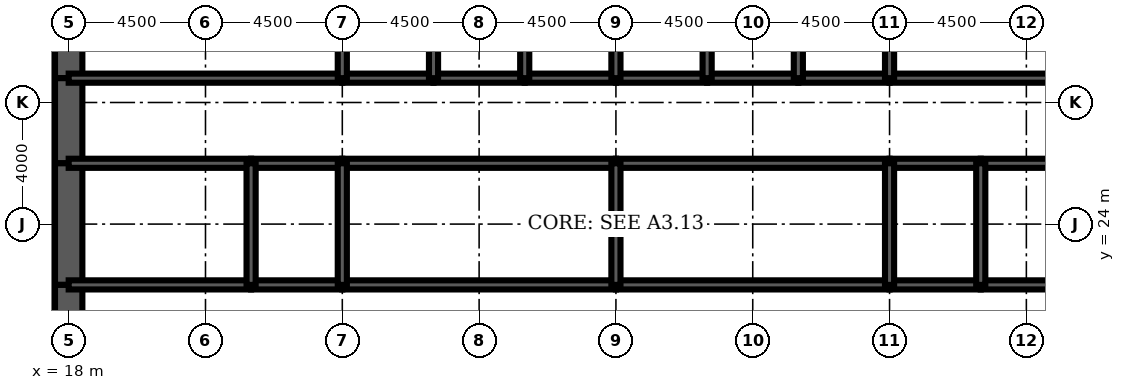
"""IFC4 building model, lengths in metres.
Left out: names, types, materials, properties, quantities, classifications, styles, units other than length and angle.
Written with IfcOpenShell. Run it as: python <this file> out.ifc"""

import sys

from ifc_helpers import new_model, si_unit, direction, frame, frame_2d, origin, place, context, subcontext, project, spatial, rectangle, extrude, element, fill, save


model = new_model("IFC4")
c1 = context("Model", 3, precision=1e-05, world=origin(), true_north=direction((0.0, 1.0)))
c2 = subcontext(c1, "Body", "Model", "MODEL_VIEW")
j1 = project(units=[si_unit("LENGTHUNIT", "METRE"), si_unit("PLANEANGLEUNIT", "RADIAN")], contexts=[c1])
p1 = place(None, origin())
s1 = spatial("IfcSite", under=j1, at=p1, CompositionType="ELEMENT")
p2 = place(p1, origin())
s2 = spatial("IfcBuilding", under=s1, at=p2, CompositionType="ELEMENT")
p3 = place(p2, frame((0.0, 0.0, 54.5)))
s3 = spatial("IfcBuildingStorey", under=s2, at=p3, CompositionType="ELEMENT", Elevation=54.5)
p4 = place(p3, frame((18.0, 32.0, 0.0), z_axis=(0.0, 0.0, 1.0), x_axis=(0.0, -1.0, 0.0)))
e1 = element("IfcWall", 1, at=p4, inside=s3, PredefinedType="SHEAR", context=c2, shape_type="SweptSolid", body=[
    extrude(rectangle(XDim=3.2, YDim=0.9, at=frame_2d((1.6, 0.0))), origin(), (0.0, 0.0, 1.0), 4.5),
])
p5 = place(p3, frame((18.0, 28.8, 0.0), z_axis=(0.0, 0.0, 1.0), x_axis=(0.0, -1.0, 0.0)))
e2 = element("IfcWall", 2, at=p5, inside=s3, PredefinedType="SHEAR", context=c2, shape_type="SweptSolid", body=[
    extrude(rectangle(XDim=2.8, YDim=0.9, at=frame_2d((1.4, 0.0))), origin(), (0.0, 0.0, 1.0), 4.5),
])
p6 = place(p5, frame((0.4, 0.0, 0.0)))
e3 = element("IfcOpeningElement", 3, at=p6, cuts=e2, PredefinedType="OPENING", context=c2, shape_type="SweptSolid", body=[
    extrude(rectangle(XDim=1.8, YDim=2.1, at=frame_2d((0.9, 1.05))), frame((0.0, 0.46, 0.0), z_axis=(0.0, -1.0, 0.0), x_axis=(1.0, 0.0, 0.0)), (0.0, 0.0, 1.0), 0.92),
])
p7 = place(p3, frame((18.0, 26.0, 0.0), z_axis=(0.0, 0.0, 1.0), x_axis=(0.0, -1.0, 0.0)))
e4 = element("IfcWall", 4, at=p7, inside=s3, PredefinedType="SHEAR", context=c2, shape_type="SweptSolid", body=[
    extrude(rectangle(XDim=4.0, YDim=0.9, at=frame_2d((2.0, 0.0))), origin(), (0.0, 0.0, 1.0), 4.5),
])
p8 = place(p3, frame((18.0, 22.0, 0.0), z_axis=(0.0, 0.0, 1.0), x_axis=(0.0, -1.0, 0.0)))
e5 = element("IfcWall", 5, at=p8, inside=s3, PredefinedType="SHEAR", context=c2, shape_type="SweptSolid", body=[
    extrude(rectangle(XDim=2.8, YDim=0.9, at=frame_2d((1.4, 0.0))), origin(), (0.0, 0.0, 1.0), 4.5),
])
p9 = place(p8, frame((0.6, 0.0, 0.0)))
e6 = element("IfcOpeningElement", 6, at=p9, cuts=e5, PredefinedType="OPENING", context=c2, shape_type="SweptSolid", body=[
    extrude(rectangle(XDim=1.8, YDim=2.1, at=frame_2d((0.9, 1.05))), frame((0.0, 0.46, 0.0), z_axis=(0.0, -1.0, 0.0), x_axis=(1.0, 0.0, 0.0)), (0.0, 0.0, 1.0), 0.92),
])
p10 = place(p3, frame((18.0, 28.8, 0.0), z_axis=(0.0, 0.0, 1.0), x_axis=(1.0, 0.0, 0.0)))
e7 = element("IfcWall", 7, at=p10, inside=s3, PredefinedType="SOLIDWALL", context=c2, shape_type="SweptSolid", body=[
    extrude(rectangle(XDim=9.0, YDim=0.3, at=frame_2d((4.5, 0.0))), origin(), (0.0, 0.0, 1.0), 4.5),
])
p11 = place(p10, frame((0.65, 0.0, 0.0)))
e8 = element("IfcOpeningElement", 8, at=p11, cuts=e7, PredefinedType="OPENING", context=c2, shape_type="SweptSolid", body=[
    extrude(rectangle(XDim=1.0, YDim=2.1, at=frame_2d((0.5, 1.05))), frame((0.0, 0.16, 0.0), z_axis=(0.0, -1.0, 0.0), x_axis=(1.0, 0.0, 0.0)), (0.0, 0.0, 1.0), 0.32),
])
p12 = place(p3, frame((27.0, 28.8, 0.0), z_axis=(0.0, 0.0, 1.0), x_axis=(1.0, 0.0, 0.0)))
e9 = element("IfcWall", 9, at=p12, inside=s3, PredefinedType="SOLIDWALL", context=c2, shape_type="SweptSolid", body=[
    extrude(rectangle(XDim=3.0, YDim=0.3, at=frame_2d((1.5, 0.0))), origin(), (0.0, 0.0, 1.0), 4.5),
])
p13 = place(p12, frame((0.95, 0.0, 0.0)))
e10 = element("IfcOpeningElement", 10, at=p13, cuts=e9, PredefinedType="OPENING", context=c2, shape_type="SweptSolid", body=[
    extrude(rectangle(XDim=1.1, YDim=2.2, at=frame_2d((0.55, 1.1))), frame((0.0, 0.16, 0.0), z_axis=(0.0, -1.0, 0.0), x_axis=(1.0, 0.0, 0.0)), (0.0, 0.0, 1.0), 0.32),
])
p14 = place(p3, frame((30.0, 28.8, 0.0), z_axis=(0.0, 0.0, 1.0), x_axis=(1.0, 0.0, 0.0)))
e11 = element("IfcWall", 11, at=p14, inside=s3, PredefinedType="SOLIDWALL", context=c2, shape_type="SweptSolid", body=[
    extrude(rectangle(XDim=3.0, YDim=0.3, at=frame_2d((1.5, 0.0))), origin(), (0.0, 0.0, 1.0), 4.5),
])
p15 = place(p14, frame((0.95, 0.0, 0.0)))
e12 = element("IfcOpeningElement", 12, at=p15, cuts=e11, PredefinedType="OPENING", context=c2, shape_type="SweptSolid", body=[
    extrude(rectangle(XDim=1.1, YDim=2.2, at=frame_2d((0.55, 1.1))), frame((0.0, 0.16, 0.0), z_axis=(0.0, -1.0, 0.0), x_axis=(1.0, 0.0, 0.0)), (0.0, 0.0, 1.0), 0.32),
])
p16 = place(p3, frame((33.0, 28.8, 0.0), z_axis=(0.0, 0.0, 1.0), x_axis=(1.0, 0.0, 0.0)))
e13 = element("IfcWall", 13, at=p16, inside=s3, PredefinedType="SOLIDWALL", context=c2, shape_type="SweptSolid", body=[
    extrude(rectangle(XDim=3.0, YDim=0.3, at=frame_2d((1.5, 0.0))), origin(), (0.0, 0.0, 1.0), 4.5),
])
p17 = place(p16, frame((0.95, 0.0, 0.0)))
e14 = element("IfcOpeningElement", 14, at=p17, cuts=e13, PredefinedType="OPENING", context=c2, shape_type="SweptSolid", body=[
    extrude(rectangle(XDim=1.1, YDim=2.2, at=frame_2d((0.55, 1.1))), frame((0.0, 0.16, 0.0), z_axis=(0.0, -1.0, 0.0), x_axis=(1.0, 0.0, 0.0)), (0.0, 0.0, 1.0), 0.32),
])
for number, where, z_axis, x_axis in (
    (15, (36.0, 28.8, 0.0), (0.0, 0.0, 1.0), (1.0, 0.0, 0.0)),
    (16, (39.0, 28.8, 0.0), (0.0, 0.0, 1.0), (1.0, 0.0, 0.0)),
):
    element("IfcWall", number, at=place(p3, frame(where, z_axis=z_axis, x_axis=x_axis)), inside=s3, PredefinedType="SOLIDWALL", context=c2, shape_type="SweptSolid", body=[
        extrude(rectangle(XDim=3.0, YDim=0.3, at=frame_2d((1.5, 0.0))), origin(), (0.0, 0.0, 1.0), 4.5),
    ])
p18 = place(p3, frame((42.0, 28.8, 0.0), z_axis=(0.0, 0.0, 1.0), x_axis=(1.0, 0.0, 0.0)))
e17 = element("IfcWall", 17, at=p18, inside=s3, PredefinedType="SOLIDWALL", context=c2, shape_type="SweptSolid", body=[
    extrude(rectangle(XDim=3.0, YDim=0.3, at=frame_2d((1.5, 0.0))), origin(), (0.0, 0.0, 1.0), 4.5),
])
p19 = place(p18, frame((0.95, 0.0, 0.0)))
e18 = element("IfcOpeningElement", 18, at=p19, cuts=e17, PredefinedType="OPENING", context=c2, shape_type="SweptSolid", body=[
    extrude(rectangle(XDim=1.1, YDim=2.2, at=frame_2d((0.55, 1.1))), frame((0.0, 0.16, 0.0), z_axis=(0.0, -1.0, 0.0), x_axis=(1.0, 0.0, 0.0)), (0.0, 0.0, 1.0), 0.32),
])
p20 = place(p3, frame((45.0, 28.8, 0.0), z_axis=(0.0, 0.0, 1.0), x_axis=(1.0, 0.0, 0.0)))
e19 = element("IfcWall", 19, at=p20, inside=s3, PredefinedType="SOLIDWALL", context=c2, shape_type="SweptSolid", body=[
    extrude(rectangle(XDim=9.0, YDim=0.3, at=frame_2d((4.5, 0.0))), origin(), (0.0, 0.0, 1.0), 4.5),
])
p21 = place(p20, frame((7.35, 0.0, 0.0)))
e20 = element("IfcOpeningElement", 20, at=p21, cuts=e19, PredefinedType="OPENING", context=c2, shape_type="SweptSolid", body=[
    extrude(rectangle(XDim=1.0, YDim=2.1, at=frame_2d((0.5, 1.05))), frame((0.0, 0.16, 0.0), z_axis=(0.0, -1.0, 0.0), x_axis=(1.0, 0.0, 0.0)), (0.0, 0.0, 1.0), 0.32),
])
p22 = place(p3, frame((18.0, 22.0, 0.0), z_axis=(0.0, 0.0, 1.0), x_axis=(1.0, 0.0, 0.0)))
e21 = element("IfcWall", 21, at=p22, inside=s3, PredefinedType="SOLIDWALL", context=c2, shape_type="SweptSolid", body=[
    extrude(rectangle(XDim=6.0, YDim=0.3, at=frame_2d((3.0, 0.0))), origin(), (0.0, 0.0, 1.0), 4.5),
])
p23 = place(p22, frame((4.4, 0.0, 0.0)))
e22 = element("IfcOpeningElement", 22, at=p23, cuts=e21, PredefinedType="OPENING", context=c2, shape_type="SweptSolid", body=[
    extrude(rectangle(XDim=1.0, YDim=2.1, at=frame_2d((0.5, 1.05))), frame((0.0, 0.16, 0.0), z_axis=(0.0, -1.0, 0.0), x_axis=(1.0, 0.0, 0.0)), (0.0, 0.0, 1.0), 0.32),
])
p24 = place(p22, frame((0.7, 0.0, 0.0)))
e23 = element("IfcOpeningElement", 23, at=p24, cuts=e21, PredefinedType="OPENING", context=c2, shape_type="SweptSolid", body=[
    extrude(rectangle(XDim=1.0, YDim=2.1, at=frame_2d((0.5, 1.05))), frame((0.0, 0.16, 0.0), z_axis=(0.0, -1.0, 0.0), x_axis=(1.0, 0.0, 0.0)), (0.0, 0.0, 1.0), 0.32),
])
p25 = place(p3, frame((24.0, 22.0, 0.0), z_axis=(0.0, 0.0, 1.0), x_axis=(1.0, 0.0, 0.0)))
e24 = element("IfcWall", 24, at=p25, inside=s3, PredefinedType="SOLIDWALL", context=c2, shape_type="SweptSolid", body=[
    extrude(rectangle(XDim=3.0, YDim=0.3, at=frame_2d((1.5, 0.0))), origin(), (0.0, 0.0, 1.0), 4.5),
])
p26 = place(p25, frame((1.0, 0.0, 0.0)))
e25 = element("IfcOpeningElement", 25, at=p26, cuts=e24, PredefinedType="OPENING", context=c2, shape_type="SweptSolid", body=[
    extrude(rectangle(XDim=1.0, YDim=2.1, at=frame_2d((0.5, 1.05))), frame((0.0, 0.16, 0.0), z_axis=(0.0, -1.0, 0.0), x_axis=(1.0, 0.0, 0.0)), (0.0, 0.0, 1.0), 0.32),
])
p27 = place(p3, frame((27.0, 22.0, 0.0), z_axis=(0.0, 0.0, 1.0), x_axis=(1.0, 0.0, 0.0)))
e26 = element("IfcWall", 26, at=p27, inside=s3, PredefinedType="SOLIDWALL", context=c2, shape_type="SweptSolid", body=[
    extrude(rectangle(XDim=9.0, YDim=0.3, at=frame_2d((4.5, 0.0))), origin(), (0.0, 0.0, 1.0), 4.5),
])
p28 = place(p27, frame((4.0, 0.0, 0.0)))
e27 = element("IfcOpeningElement", 27, at=p28, cuts=e26, PredefinedType="OPENING", context=c2, shape_type="SweptSolid", body=[
    extrude(rectangle(XDim=1.0, YDim=2.1, at=frame_2d((0.5, 1.05))), frame((0.0, 0.16, 0.0), z_axis=(0.0, -1.0, 0.0), x_axis=(1.0, 0.0, 0.0)), (0.0, 0.0, 1.0), 0.32),
])
p29 = place(p3, frame((36.0, 22.0, 0.0), z_axis=(0.0, 0.0, 1.0), x_axis=(1.0, 0.0, 0.0)))
e28 = element("IfcWall", 28, at=p29, inside=s3, PredefinedType="SOLIDWALL", context=c2, shape_type="SweptSolid", body=[
    extrude(rectangle(XDim=9.0, YDim=0.3, at=frame_2d((4.5, 0.0))), origin(), (0.0, 0.0, 1.0), 4.5),
])
p30 = place(p29, frame((4.0, 0.0, 0.0)))
e29 = element("IfcOpeningElement", 29, at=p30, cuts=e28, PredefinedType="OPENING", context=c2, shape_type="SweptSolid", body=[
    extrude(rectangle(XDim=1.0, YDim=2.1, at=frame_2d((0.5, 1.05))), frame((0.0, 0.16, 0.0), z_axis=(0.0, -1.0, 0.0), x_axis=(1.0, 0.0, 0.0)), (0.0, 0.0, 1.0), 0.32),
])
p31 = place(p3, frame((45.0, 22.0, 0.0), z_axis=(0.0, 0.0, 1.0), x_axis=(1.0, 0.0, 0.0)))
e30 = element("IfcWall", 30, at=p31, inside=s3, PredefinedType="SOLIDWALL", context=c2, shape_type="SweptSolid", body=[
    extrude(rectangle(XDim=3.0, YDim=0.3, at=frame_2d((1.5, 0.0))), origin(), (0.0, 0.0, 1.0), 4.5),
])
p32 = place(p31, frame((1.0, 0.0, 0.0)))
e31 = element("IfcOpeningElement", 31, at=p32, cuts=e30, PredefinedType="OPENING", context=c2, shape_type="SweptSolid", body=[
    extrude(rectangle(XDim=1.0, YDim=2.1, at=frame_2d((0.5, 1.05))), frame((0.0, 0.16, 0.0), z_axis=(0.0, -1.0, 0.0), x_axis=(1.0, 0.0, 0.0)), (0.0, 0.0, 1.0), 0.32),
])
p33 = place(p3, frame((48.0, 22.0, 0.0), z_axis=(0.0, 0.0, 1.0), x_axis=(1.0, 0.0, 0.0)))
e32 = element("IfcWall", 32, at=p33, inside=s3, PredefinedType="SOLIDWALL", context=c2, shape_type="SweptSolid", body=[
    extrude(rectangle(XDim=6.0, YDim=0.3, at=frame_2d((3.0, 0.0))), origin(), (0.0, 0.0, 1.0), 4.5),
])
p34 = place(p33, frame((2.0, 0.0, 0.0)))
e33 = element("IfcOpeningElement", 33, at=p34, cuts=e32, PredefinedType="OPENING", context=c2, shape_type="SweptSolid", body=[
    extrude(rectangle(XDim=1.0, YDim=2.1, at=frame_2d((0.5, 1.05))), frame((0.0, 0.16, 0.0), z_axis=(0.0, -1.0, 0.0), x_axis=(1.0, 0.0, 0.0)), (0.0, 0.0, 1.0), 0.32),
])
p35 = place(p33, frame((4.3, 0.0, 0.0)))
e34 = element("IfcOpeningElement", 34, at=p35, cuts=e32, PredefinedType="OPENING", context=c2, shape_type="SweptSolid", body=[
    extrude(rectangle(XDim=1.0, YDim=2.1, at=frame_2d((0.5, 1.05))), frame((0.0, 0.16, 0.0), z_axis=(0.0, -1.0, 0.0), x_axis=(1.0, 0.0, 0.0)), (0.0, 0.0, 1.0), 0.32),
])
p36 = place(p3, frame((18.0, 26.0, 0.0), z_axis=(0.0, 0.0, 1.0), x_axis=(1.0, 0.0, 0.0)))
e35 = element("IfcWall", 35, at=p36, inside=s3, PredefinedType="SOLIDWALL", context=c2, shape_type="SweptSolid", body=[
    extrude(rectangle(XDim=6.0, YDim=0.3, at=frame_2d((3.0, 0.0))), origin(), (0.0, 0.0, 1.0), 4.5),
])
p37 = place(p3, frame((24.0, 26.0, 0.0), z_axis=(0.0, 0.0, 1.0), x_axis=(1.0, 0.0, 0.0)))
e36 = element("IfcWall", 36, at=p37, inside=s3, PredefinedType="SOLIDWALL", context=c2, shape_type="SweptSolid", body=[
    extrude(rectangle(XDim=3.0, YDim=0.3, at=frame_2d((1.5, 0.0))), origin(), (0.0, 0.0, 1.0), 4.5),
])
for number, where, z_axis, x_axis in (
    (37, (27.0, 26.0, 0.0), (0.0, 0.0, 1.0), (1.0, 0.0, 0.0)),
    (38, (36.0, 26.0, 0.0), (0.0, 0.0, 1.0), (1.0, 0.0, 0.0)),
):
    element("IfcWall", number, at=place(p3, frame(where, z_axis=z_axis, x_axis=x_axis)), inside=s3, PredefinedType="SOLIDWALL", context=c2, shape_type="SweptSolid", body=[
        extrude(rectangle(XDim=9.0, YDim=0.3, at=frame_2d((4.5, 0.0))), origin(), (0.0, 0.0, 1.0), 4.5),
    ])
p38 = place(p3, frame((45.0, 26.0, 0.0), z_axis=(0.0, 0.0, 1.0), x_axis=(1.0, 0.0, 0.0)))
e39 = element("IfcWall", 39, at=p38, inside=s3, PredefinedType="SOLIDWALL", context=c2, shape_type="SweptSolid", body=[
    extrude(rectangle(XDim=3.0, YDim=0.3, at=frame_2d((1.5, 0.0))), origin(), (0.0, 0.0, 1.0), 4.5),
])
p39 = place(p3, frame((48.0, 26.0, 0.0), z_axis=(0.0, 0.0, 1.0), x_axis=(1.0, 0.0, 0.0)))
e40 = element("IfcWall", 40, at=p39, inside=s3, PredefinedType="SOLIDWALL", context=c2, shape_type="SweptSolid", body=[
    extrude(rectangle(XDim=6.0, YDim=0.3, at=frame_2d((3.0, 0.0))), origin(), (0.0, 0.0, 1.0), 4.5),
])
for number, where, z_axis, x_axis in (
    (41, (27.0, 28.8, 0.0), (0.0, 0.0, 1.0), (0.0, 1.0, 0.0)),
    (42, (30.0, 28.8, 0.0), (0.0, 0.0, 1.0), (0.0, 1.0, 0.0)),
    (43, (33.0, 28.8, 0.0), (0.0, 0.0, 1.0), (0.0, 1.0, 0.0)),
    (44, (36.0, 28.8, 0.0), (0.0, 0.0, 1.0), (0.0, 1.0, 0.0)),
    (45, (39.0, 28.8, 0.0), (0.0, 0.0, 1.0), (0.0, 1.0, 0.0)),
    (46, (42.0, 28.8, 0.0), (0.0, 0.0, 1.0), (0.0, 1.0, 0.0)),
    (47, (45.0, 28.8, 0.0), (0.0, 0.0, 1.0), (0.0, 1.0, 0.0)),
):
    element("IfcWall", number, at=place(p3, frame(where, z_axis=z_axis, x_axis=x_axis)), inside=s3, PredefinedType="SOLIDWALL", context=c2, shape_type="SweptSolid", body=[
        extrude(rectangle(XDim=3.2, YDim=0.3, at=frame_2d((1.6, 0.0))), origin(), (0.0, 0.0, 1.0), 4.5),
    ])
for number, where, z_axis, x_axis in (
    (48, (24.0, 22.0, 0.0), (0.0, 0.0, 1.0), (0.0, 1.0, 0.0)),
    (49, (27.0, 22.0, 0.0), (0.0, 0.0, 1.0), (0.0, 1.0, 0.0)),
    (50, (36.0, 22.0, 0.0), (0.0, 0.0, 1.0), (0.0, 1.0, 0.0)),
    (51, (45.0, 22.0, 0.0), (0.0, 0.0, 1.0), (0.0, 1.0, 0.0)),
    (52, (48.0, 22.0, 0.0), (0.0, 0.0, 1.0), (0.0, 1.0, 0.0)),
):
    element("IfcWall", number, at=place(p3, frame(where, z_axis=z_axis, x_axis=x_axis)), inside=s3, PredefinedType="SOLIDWALL", context=c2, shape_type="SweptSolid", body=[
        extrude(rectangle(XDim=4.0, YDim=0.3, at=frame_2d((2.0, 0.0))), origin(), (0.0, 0.0, 1.0), 4.5),
    ])
p40 = place(p3, frame((20.025, 22.15, 0.0), z_axis=(0.0, 0.0, 1.0), x_axis=(0.0, 1.0, 0.0)))
e53 = element("IfcWall", 53, at=p40, inside=s3, PredefinedType="PARTITIONING", context=c2, shape_type="SweptSolid", body=[
    extrude(rectangle(XDim=3.7, YDim=0.15, at=frame_2d((1.85, 0.0))), origin(), (0.0, 0.0, 1.0), 3.0),
])
p41 = place(p3, frame((49.2, 26.15, 0.0), z_axis=(0.0, 0.0, 1.0), x_axis=(0.0, 1.0, 0.0)))
e54 = element("IfcWall", 54, at=p41, inside=s3, PredefinedType="PARTITIONING", context=c2, shape_type="SweptSolid", body=[
    extrude(rectangle(XDim=2.5, YDim=0.15, at=frame_2d((1.25, 0.0))), origin(), (0.0, 0.0, 1.0), 3.0),
])
p42 = place(p41, frame((1.15, 0.0, 0.0)))
e55 = element("IfcOpeningElement", 55, at=p42, cuts=e54, PredefinedType="OPENING", context=c2, shape_type="SweptSolid", body=[
    extrude(rectangle(XDim=1.0, YDim=2.1, at=frame_2d((0.5, 1.05))), frame((0.0, 0.085, 0.0), z_axis=(0.0, -1.0, 0.0), x_axis=(1.0, 0.0, 0.0)), (0.0, 0.0, 1.0), 0.17),
])
p43 = place(p3, frame((24.5, 19.35, 0.0), z_axis=(0.0, 0.0, 1.0), x_axis=(0.0, 1.0, 0.0)))
e56 = element("IfcWall", 56, at=p43, inside=s3, PredefinedType="PARTITIONING", context=c2, shape_type="SweptSolid", body=[
    extrude(rectangle(XDim=2.5, YDim=0.15, at=frame_2d((1.25, 0.0))), origin(), (0.0, 0.0, 1.0), 3.0),
])
p44 = place(p43, frame((1.15, 0.0, 0.0)))
e57 = element("IfcOpeningElement", 57, at=p44, cuts=e56, PredefinedType="OPENING", context=c2, shape_type="SweptSolid", body=[
    extrude(rectangle(XDim=1.0, YDim=2.1, at=frame_2d((0.5, 1.05))), frame((0.0, 0.085, 0.0), z_axis=(0.0, -1.0, 0.0), x_axis=(1.0, 0.0, 0.0)), (0.0, 0.0, 1.0), 0.17),
])
p45 = place(p42, origin())
e58 = element("IfcDoor", 58, at=p45, inside=s3, OperationType="SINGLE_SWING_RIGHT", PredefinedType="DOOR", context=c2, shape_type="SweptSolid", body=[
    extrude(rectangle(XDim=1.0, YDim=2.1, at=frame_2d((0.5, 1.05))), frame((0.0, 0.025, 0.0), z_axis=(0.0, -1.0, 0.0), x_axis=(1.0, 0.0, 0.0)), (0.0, 0.0, 1.0), 0.05),
])
fill(e55, e58)
p46 = place(p44, origin())
e59 = element("IfcDoor", 59, at=p46, inside=s3, OperationType="SINGLE_SWING_RIGHT", PredefinedType="DOOR", context=c2, shape_type="SweptSolid", body=[
    extrude(rectangle(XDim=1.0, YDim=2.1, at=frame_2d((0.5, 1.05))), frame((0.0, 0.025, 0.0), z_axis=(0.0, -1.0, 0.0), x_axis=(1.0, 0.0, 0.0)), (0.0, 0.0, 1.0), 0.05),
])
fill(e57, e59)
p47 = place(p19, origin())
e60 = element("IfcDoor", 60, at=p47, inside=s3, OperationType="DOUBLE_DOOR_SLIDING", PredefinedType="USERDEFINED", context=c2, shape_type="SweptSolid", body=[
    extrude(rectangle(XDim=1.1, YDim=2.2, at=frame_2d((0.55, 1.1))), frame((0.0, 0.025, 0.0), z_axis=(0.0, -1.0, 0.0), x_axis=(1.0, 0.0, 0.0)), (0.0, 0.0, 1.0), 0.05),
])
fill(e18, e60)
p48 = place(p13, origin())
e61 = element("IfcDoor", 61, at=p48, inside=s3, OperationType="DOUBLE_DOOR_SLIDING", PredefinedType="USERDEFINED", context=c2, shape_type="SweptSolid", body=[
    extrude(rectangle(XDim=1.1, YDim=2.2, at=frame_2d((0.55, 1.1))), frame((0.0, 0.025, 0.0), z_axis=(0.0, -1.0, 0.0), x_axis=(1.0, 0.0, 0.0)), (0.0, 0.0, 1.0), 0.05),
])
fill(e10, e61)
p49 = place(p15, origin())
e62 = element("IfcDoor", 62, at=p49, inside=s3, OperationType="DOUBLE_DOOR_SLIDING", PredefinedType="USERDEFINED", context=c2, shape_type="SweptSolid", body=[
    extrude(rectangle(XDim=1.1, YDim=2.2, at=frame_2d((0.55, 1.1))), frame((0.0, 0.025, 0.0), z_axis=(0.0, -1.0, 0.0), x_axis=(1.0, 0.0, 0.0)), (0.0, 0.0, 1.0), 0.05),
])
fill(e12, e62)
p50 = place(p17, origin())
e63 = element("IfcDoor", 63, at=p50, inside=s3, OperationType="DOUBLE_DOOR_SLIDING", PredefinedType="USERDEFINED", context=c2, shape_type="SweptSolid", body=[
    extrude(rectangle(XDim=1.1, YDim=2.2, at=frame_2d((0.55, 1.1))), frame((0.0, 0.025, 0.0), z_axis=(0.0, -1.0, 0.0), x_axis=(1.0, 0.0, 0.0)), (0.0, 0.0, 1.0), 0.05),
])
fill(e14, e63)
p51 = place(p11, origin())
e64 = element("IfcDoor", 64, at=p51, inside=s3, OperationType="SINGLE_SWING_LEFT", PredefinedType="DOOR", context=c2, shape_type="SweptSolid", body=[
    extrude(rectangle(XDim=1.0, YDim=2.1, at=frame_2d((0.5, 1.05))), frame((0.0, 0.025, 0.0), z_axis=(0.0, -1.0, 0.0), x_axis=(1.0, 0.0, 0.0)), (0.0, 0.0, 1.0), 0.05),
])
fill(e8, e64)
p52 = place(p9, origin())
e65 = element("IfcDoor", 65, at=p52, inside=s3, OperationType="SINGLE_SWING_LEFT", PredefinedType="DOOR", context=c2, shape_type="SweptSolid", body=[
    extrude(rectangle(XDim=1.8, YDim=2.1, at=frame_2d((0.9, 1.05))), frame((0.0, 0.45, 0.0), z_axis=(0.0, -1.0, 0.0), x_axis=(1.0, 0.0, 0.0)), (0.0, 0.0, 1.0), 0.899),
])
fill(e6, e65)
p53 = place(p6, origin())
e66 = element("IfcDoor", 66, at=p53, inside=s3, OperationType="SINGLE_SWING_LEFT", PredefinedType="DOOR", context=c2, shape_type="SweptSolid", body=[
    extrude(rectangle(XDim=1.8, YDim=2.1, at=frame_2d((0.9, 1.05))), frame((0.0, 0.45, 0.0), z_axis=(0.0, -1.0, 0.0), x_axis=(1.0, 0.0, 0.0)), (0.0, 0.0, 1.0), 0.899),
])
fill(e3, e66)
p54 = place(p23, origin())
e67 = element("IfcDoor", 67, at=p54, inside=s3, OperationType="SINGLE_SWING_RIGHT", PredefinedType="DOOR", context=c2, shape_type="SweptSolid", body=[
    extrude(rectangle(XDim=1.0, YDim=2.1, at=frame_2d((0.5, 1.05))), frame((0.0, 0.025, 0.0), z_axis=(0.0, -1.0, 0.0), x_axis=(1.0, 0.0, 0.0)), (0.0, 0.0, 1.0), 0.05),
])
fill(e22, e67)
p55 = place(p26, origin())
e68 = element("IfcDoor", 68, at=p55, inside=s3, OperationType="SINGLE_SWING_LEFT", PredefinedType="DOOR", context=c2, shape_type="SweptSolid", body=[
    extrude(rectangle(XDim=1.0, YDim=2.1, at=frame_2d((0.5, 1.05))), frame((0.0, 0.025, 0.0), z_axis=(0.0, -1.0, 0.0), x_axis=(1.0, 0.0, 0.0)), (0.0, 0.0, 1.0), 0.05),
])
fill(e25, e68)
p56 = place(p28, origin())
e69 = element("IfcDoor", 69, at=p56, inside=s3, OperationType="SINGLE_SWING_LEFT", PredefinedType="DOOR", context=c2, shape_type="SweptSolid", body=[
    extrude(rectangle(XDim=1.0, YDim=2.1, at=frame_2d((0.5, 1.05))), frame((0.0, 0.025, 0.0), z_axis=(0.0, -1.0, 0.0), x_axis=(1.0, 0.0, 0.0)), (0.0, 0.0, 1.0), 0.05),
])
fill(e27, e69)
p57 = place(p30, origin())
e70 = element("IfcDoor", 70, at=p57, inside=s3, OperationType="SINGLE_SWING_LEFT", PredefinedType="DOOR", context=c2, shape_type="SweptSolid", body=[
    extrude(rectangle(XDim=1.0, YDim=2.1, at=frame_2d((0.5, 1.05))), frame((0.0, 0.025, 0.0), z_axis=(0.0, -1.0, 0.0), x_axis=(1.0, 0.0, 0.0)), (0.0, 0.0, 1.0), 0.05),
])
fill(e29, e70)
p58 = place(p32, origin())
e71 = element("IfcDoor", 71, at=p58, inside=s3, OperationType="SINGLE_SWING_LEFT", PredefinedType="DOOR", context=c2, shape_type="SweptSolid", body=[
    extrude(rectangle(XDim=1.0, YDim=2.1, at=frame_2d((0.5, 1.05))), frame((0.0, 0.025, 0.0), z_axis=(0.0, -1.0, 0.0), x_axis=(1.0, 0.0, 0.0)), (0.0, 0.0, 1.0), 0.05),
])
fill(e31, e71)
p59 = place(p34, origin())
e72 = element("IfcDoor", 72, at=p59, inside=s3, OperationType="SINGLE_SWING_LEFT", PredefinedType="DOOR", context=c2, shape_type="SweptSolid", body=[
    extrude(rectangle(XDim=1.0, YDim=2.1, at=frame_2d((0.5, 1.05))), frame((0.0, 0.025, 0.0), z_axis=(0.0, -1.0, 0.0), x_axis=(1.0, 0.0, 0.0)), (0.0, 0.0, 1.0), 0.05),
])
fill(e33, e72)
p60 = place(p24, origin())
e73 = element("IfcDoor", 73, at=p60, inside=s3, OperationType="SINGLE_SWING_LEFT", PredefinedType="DOOR", context=c2, shape_type="SweptSolid", body=[
    extrude(rectangle(XDim=1.0, YDim=2.1, at=frame_2d((0.5, 1.05))), frame((0.0, 0.025, 0.0), z_axis=(0.0, -1.0, 0.0), x_axis=(1.0, 0.0, 0.0)), (0.0, 0.0, 1.0), 0.05),
])
fill(e23, e73)
save(model, sys.argv[1])
